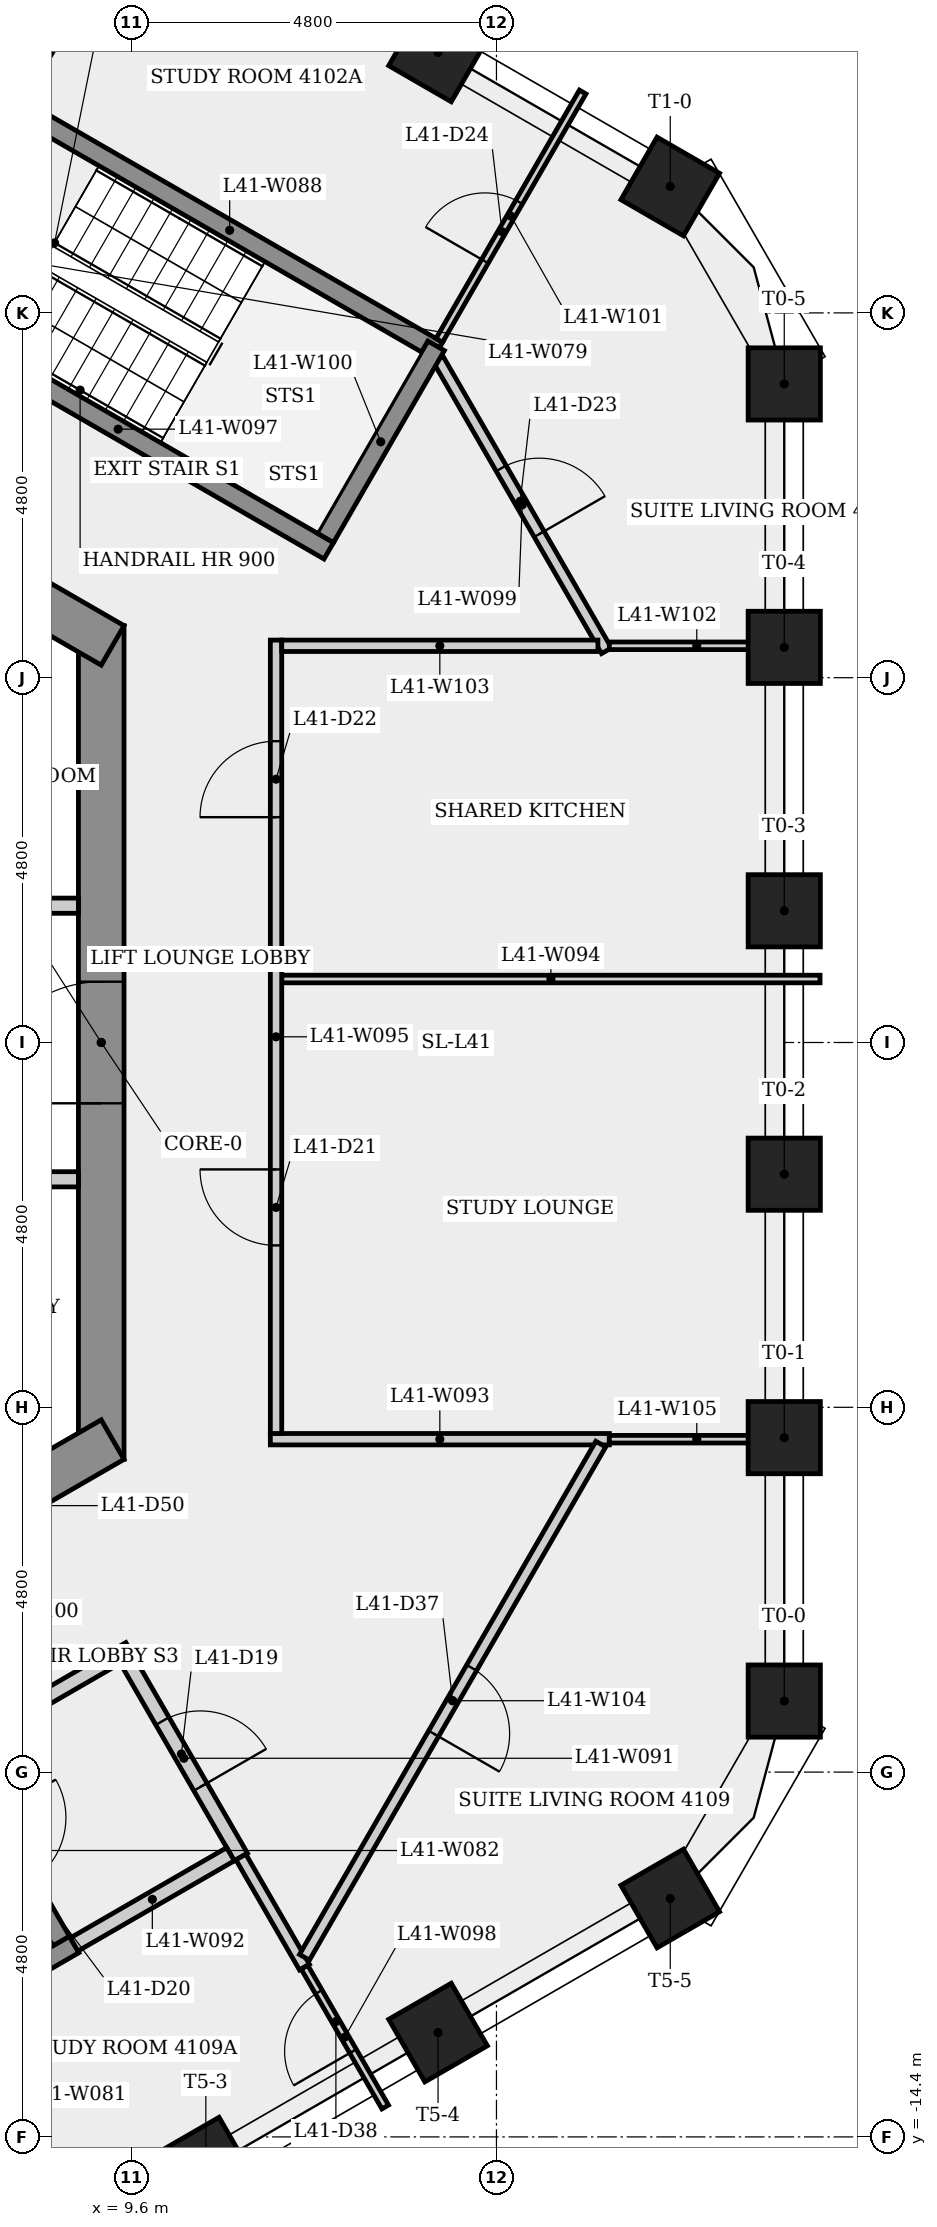
"""IFC4 building model, lengths in metres.
Left out: names, types, materials, properties, quantities, classifications, styles, units other than length and angle.
Written with IfcOpenShell. Run it as: python <this file> out.ifc"""

import sys

from ifc_helpers import new_model, si_unit, direction, frame, frame_2d, origin, origin_2d, place, context, subcontext, project, spatial, rectangle, extrude, element, fill, save


model = new_model("IFC4")
c1 = context("Model", 3, precision=1e-05, world=origin(), true_north=direction((0.0, 1.0)))
c2 = subcontext(c1, "Body", "Model", "MODEL_VIEW")
j1 = project(units=[si_unit("LENGTHUNIT", "METRE"), si_unit("PLANEANGLEUNIT", "RADIAN")], contexts=[c1])
p1 = place(None, origin())
s1 = spatial("IfcSite", under=j1, at=p1, CompositionType="ELEMENT")
p2 = place(p1, origin())
s2 = spatial("IfcBuilding", under=s1, at=p2, CompositionType="ELEMENT")
p3 = place(p2, frame((0.0, 0.0, 156.1)))
s3 = spatial("IfcBuildingStorey", under=s2, at=p3, CompositionType="ELEMENT", Elevation=156.1)
p4 = place(p3, frame((9.2, -5.485, 0.0), z_axis=(0.0, 0.0, 1.0), x_axis=(0.0, 1.0, 0.0)))
e1 = element("IfcWall", 1, at=p4, inside=s3, PredefinedType="SHEAR", context=c2, shape_type="SweptSolid", body=[
    extrude(rectangle(XDim=10.97, YDim=0.6, at=frame_2d((5.485, 0.0))), origin(), (0.0, 0.0, 1.0), 3.4),
])
p5 = place(p4, frame((4.685, 0.0, 0.0)))
e2 = element("IfcOpeningElement", 2, at=p5, cuts=e1, PredefinedType="OPENING", context=c2, shape_type="SweptSolid", body=[
    extrude(rectangle(XDim=1.6, YDim=2.1, at=frame_2d((0.8, 1.05))), frame((0.0, 0.31, 0.0), z_axis=(0.0, -1.0, 0.0), x_axis=(1.0, 0.0, 0.0)), (0.0, 0.0, 1.0), 0.62),
])
p6 = place(p3, frame((9.35, 5.225, 0.0), z_axis=(0.0, 0.0, 1.0), x_axis=(-0.866023993627, 0.500002442456, 0.0)))
e3 = element("IfcWall", 3, at=p6, inside=s3, PredefinedType="SHEAR", context=c2, shape_type="SweptSolid", body=[
    extrude(rectangle(XDim=10.97, YDim=0.6, at=frame_2d((5.485, 0.0))), origin(), (0.0, 0.0, 1.0), 3.4),
])
p7 = place(p6, frame((7.518, 0.0, 0.0)))
e4 = element("IfcOpeningElement", 4, at=p7, cuts=e3, PredefinedType="OPENING", context=c2, shape_type="SweptSolid", body=[
    extrude(rectangle(XDim=0.9, YDim=2.1, at=frame_2d((0.45, 1.05))), frame((0.0, 0.31, 0.0), z_axis=(0.0, -1.0, 0.0), x_axis=(1.0, 0.0, 0.0)), (0.0, 0.0, 1.0), 0.62),
])
p8 = place(p6, frame((1.172, 0.0, 0.0)))
e5 = element("IfcOpeningElement", 5, at=p8, cuts=e3, PredefinedType="OPENING", context=c2, shape_type="SweptSolid", body=[
    extrude(rectangle(XDim=0.9, YDim=2.1, at=frame_2d((0.45, 1.05))), frame((0.0, 0.31, 0.0), z_axis=(0.0, -1.0, 0.0), x_axis=(1.0, 0.0, 0.0)), (0.0, 0.0, 1.0), 0.62),
])
p9 = place(p3, frame((-0.15, -10.71, 0.0), z_axis=(0.0, 0.0, 1.0), x_axis=(0.866023993627, 0.500002442456, 0.0)))
e6 = element("IfcWall", 6, at=p9, inside=s3, PredefinedType="SHEAR", context=c2, shape_type="SweptSolid", body=[
    extrude(rectangle(XDim=10.97, YDim=0.6, at=frame_2d((5.485, 0.0))), origin(), (0.0, 0.0, 1.0), 3.4),
])
p10 = place(p9, frame((1.975, 0.0, 0.0)))
e7 = element("IfcOpeningElement", 7, at=p10, cuts=e6, PredefinedType="OPENING", context=c2, shape_type="SweptSolid", body=[
    extrude(rectangle(XDim=0.9, YDim=2.1, at=frame_2d((0.45, 1.05))), frame((0.0, 0.31, 0.0), z_axis=(0.0, -1.0, 0.0), x_axis=(1.0, 0.0, 0.0)), (0.0, 0.0, 1.0), 0.62),
])
p11 = place(p9, frame((8.782, 0.0, 0.0)))
e8 = element("IfcOpeningElement", 8, at=p11, cuts=e6, PredefinedType="OPENING", context=c2, shape_type="SweptSolid", body=[
    extrude(rectangle(XDim=0.9, YDim=2.1, at=frame_2d((0.45, 1.05))), frame((0.0, 0.31, 0.0), z_axis=(0.0, -1.0, 0.0), x_axis=(1.0, 0.0, 0.0)), (0.0, 0.0, 1.0), 0.62),
])
for number, where, z_axis, x_axis in (
    (9, (18.187, -8.665, 0.0), (0.0, 0.0, 1.0), (1.0, 0.0, 0.0)),
    (10, (18.187, -5.199, 0.0), (0.0, 0.0, 1.0), (1.0, 0.0, 0.0)),
    (11, (18.187, -1.733, 0.0), (0.0, 0.0, 1.0), (1.0, 0.0, 0.0)),
    (12, (18.187, 1.733, 0.0), (0.0, 0.0, 1.0), (1.0, 0.0, 0.0)),
    (13, (18.187, 5.199, 0.0), (0.0, 0.0, 1.0), (1.0, 0.0, 0.0)),
    (14, (18.187, 8.665, 0.0), (0.0, 0.0, 1.0), (1.0, 0.0, 0.0)),
    (15, (16.687, 11.263, 0.0), (0.0, 0.0, 1.0), (0.5, 0.866, 0.0)),
    (16, (13.631, 13.027, 0.0), (0.0, 0.0, 1.0), (0.5, 0.866, 0.0)),
    (17, (10.576, -14.791, 0.0), (0.0, 0.0, 1.0), (0.5, -0.866, 0.0)),
    (18, (13.631, -13.027, 0.0), (0.0, 0.0, 1.0), (0.5, -0.866, 0.0)),
    (19, (16.687, -11.263, 0.0), (0.0, 0.0, 1.0), (0.5, -0.866, 0.0)),
):
    element("IfcColumn", number, at=place(p3, frame(where, z_axis=z_axis, x_axis=x_axis)), inside=s3, PredefinedType="COLUMN", context=c2, shape_type="SweptSolid", body=[
        extrude(rectangle(XDim=0.95, YDim=0.95, at=origin_2d()), origin(), (0.0, 0.0, 1.0), 3.4),
    ])
p12 = place(p3, frame((4.459, 15.323, 0.0), z_axis=(0.0, 0.0, 1.0), x_axis=(0.866016039709, -0.500016218704, 0.0)))
e20 = element("IfcWall", 20, at=p12, inside=s3, PredefinedType="PARTITIONING", context=c2, shape_type="SweptSolid", body=[
    extrude(rectangle(XDim=4.7, YDim=0.2, at=frame_2d((2.35, 0.0))), origin(), (0.0, 0.0, 1.0), 3.05),
])
p13 = place(p3, frame((3.301, -15.068, 0.0), z_axis=(0.0, 0.0, 1.0), x_axis=(0.866035036182, 0.499983315828, 0.0)))
e21 = element("IfcWall", 21, at=p13, inside=s3, PredefinedType="SHEAR", context=c2, shape_type="SweptSolid", body=[
    extrude(rectangle(XDim=6.4, YDim=0.25, at=frame_2d((3.2, 0.0))), origin(), (0.0, 0.0, 1.0), 3.05),
])
p14 = place(p3, frame((7.153, -12.989, 0.0), z_axis=(0.0, 0.0, 1.0), x_axis=(0.500008086624, -0.86602073492, 0.0)))
e22 = element("IfcWall", 22, at=p14, inside=s3, PredefinedType="PARTITIONING", context=c2, shape_type="SweptSolid", body=[
    extrude(rectangle(XDim=3.773, YDim=0.1, at=frame_2d((1.887, 0.0))), origin(), (0.0, 0.0, 1.0), 3.05),
])
p15 = place(p3, frame((7.298, -9.441, 0.0), z_axis=(0.0, 0.0, 1.0), x_axis=(0.500034990121, -0.866005201286, 0.0)))
e23 = element("IfcWall", 23, at=p15, inside=s3, PredefinedType="SHEAR", context=c2, shape_type="SweptSolid", body=[
    extrude(rectangle(XDim=2.75, YDim=0.25, at=frame_2d((1.375, 0.0))), origin(), (0.0, 0.0, 1.0), 3.05),
])
p16 = place(p15, frame((0.875, 0.0, 0.0)))
e24 = element("IfcOpeningElement", 24, at=p16, cuts=e23, PredefinedType="OPENING", context=c2, shape_type="SweptSolid", body=[
    extrude(rectangle(XDim=1.0, YDim=2.1, at=frame_2d((0.5, 1.05))), frame((0.0, 0.135, 0.0), z_axis=(0.0, -1.0, 0.0), x_axis=(1.0, 0.0, 0.0)), (0.0, 0.0, 1.0), 0.27),
])
p17 = place(p3, frame((7.344, -9.27, 0.0), z_axis=(0.0, 0.0, 1.0), x_axis=(0.866005588531, 0.500034319456, 0.0)))
e25 = element("IfcWall", 25, at=p17, inside=s3, PredefinedType="PARTITIONING", context=c2, shape_type="SweptSolid", body=[
    extrude(rectangle(XDim=2.575, YDim=0.2, at=frame_2d((1.288, 0.0))), origin(), (0.0, 0.0, 1.0), 3.05),
])
p18 = place(p3, frame((7.475, 1.8, 0.0), z_axis=(0.0, 0.0, 1.0), x_axis=(1.0, 0.0, 0.0)))
e26 = element("IfcWall", 26, at=p18, inside=s3, PredefinedType="PARTITIONING", context=c2, shape_type="SweptSolid", body=[
    extrude(rectangle(XDim=1.425, YDim=0.2, at=frame_2d((0.712, 0.0))), origin(), (0.0, 0.0, 1.0), 3.05),
])
p19 = place(p3, frame((8.151, 12.268, 0.0), z_axis=(0.0, 0.0, 1.0), x_axis=(0.866032601554, -0.49998753289, 0.0)))
e27 = element("IfcWall", 27, at=p19, inside=s3, PredefinedType="SHEAR", context=c2, shape_type="SweptSolid", body=[
    extrude(rectangle(XDim=6.325, YDim=0.25, at=frame_2d((3.163, 0.0))), origin(), (0.0, 0.0, 1.0), 3.05),
])
p20 = place(p3, frame((8.9, -1.8, 0.0), z_axis=(0.0, 0.0, 1.0), x_axis=(-1.0, 0.0, 0.0)))
e28 = element("IfcWall", 28, at=p20, inside=s3, PredefinedType="PARTITIONING", context=c2, shape_type="SweptSolid", body=[
    extrude(rectangle(XDim=1.425, YDim=0.2, at=frame_2d((0.712, 0.0))), origin(), (0.0, 0.0, 1.0), 3.05),
])
p21 = place(p3, frame((9.537, -8.119, 0.0), z_axis=(0.0, 0.0, 1.0), x_axis=(0.499990139034, -0.866031096941, 0.0)))
e29 = element("IfcWall", 29, at=p21, inside=s3, PredefinedType="PARTITIONING", context=c2, shape_type="SweptSolid", body=[
    extrude(rectangle(XDim=3.0, YDim=0.2, at=frame_2d((1.5, 0.0))), origin(), (0.0, 0.0, 1.0), 3.05),
])
p22 = place(p21, frame((0.935, 0.0, 0.0)))
e30 = element("IfcOpeningElement", 30, at=p22, cuts=e29, PredefinedType="OPENING", context=c2, shape_type="SweptSolid", body=[
    extrude(rectangle(XDim=1.0, YDim=2.1, at=frame_2d((0.5, 1.05))), frame((0.0, 0.11, 0.0), z_axis=(0.0, -1.0, 0.0), x_axis=(1.0, 0.0, 0.0)), (0.0, 0.0, 1.0), 0.22),
])
p23 = place(p3, frame((10.901, -10.681, 0.0), z_axis=(0.0, 0.0, 1.0), x_axis=(-0.866007538022, -0.500030943131, 0.0)))
e31 = element("IfcWall", 31, at=p23, inside=s3, PredefinedType="PARTITIONING", context=c2, shape_type="SweptSolid", body=[
    extrude(rectangle(XDim=2.375, YDim=0.2, at=frame_2d((1.188, 0.0))), origin(), (0.0, 0.0, 1.0), 3.05),
])
p24 = place(p3, frame((11.425, -5.22, 0.0), z_axis=(0.0, 0.0, 1.0), x_axis=(1.0, 0.0, 0.0)))
e32 = element("IfcWall", 32, at=p24, inside=s3, PredefinedType="PARTITIONING", context=c2, shape_type="SweptSolid", body=[
    extrude(rectangle(XDim=4.46, YDim=0.15, at=frame_2d((2.23, 0.0))), origin(), (0.0, 0.0, 1.0), 3.05),
])
p25 = place(p3, frame((11.575, 0.835, 0.0), z_axis=(0.0, 0.0, 1.0), x_axis=(1.0, 0.0, 0.0)))
e33 = element("IfcWall", 33, at=p25, inside=s3, PredefinedType="PARTITIONING", context=c2, shape_type="SweptSolid", body=[
    extrude(rectangle(XDim=7.083, YDim=0.1, at=frame_2d((3.541, 0.0))), origin(), (0.0, 0.0, 1.0), 3.05),
])
p26 = place(p3, frame((11.5, -5.145, 0.0), z_axis=(0.0, 0.0, 1.0), x_axis=(0.0, 1.0, 0.0)))
e34 = element("IfcWall", 34, at=p26, inside=s3, PredefinedType="PARTITIONING", context=c2, shape_type="SweptSolid", body=[
    extrude(rectangle(XDim=10.439, YDim=0.15, at=frame_2d((5.22, 0.0))), origin(), (0.0, 0.0, 1.0), 3.05),
])
p27 = place(p26, frame((2.475, 0.0, 0.0)))
e35 = element("IfcOpeningElement", 35, at=p27, cuts=e34, PredefinedType="OPENING", context=c2, shape_type="SweptSolid", body=[
    extrude(rectangle(XDim=1.0, YDim=2.1, at=frame_2d((0.5, 1.05))), frame((0.0, 0.085, 0.0), z_axis=(0.0, -1.0, 0.0), x_axis=(1.0, 0.0, 0.0)), (0.0, 0.0, 1.0), 0.17),
])
p28 = place(p26, frame((8.109, 0.0, 0.0)))
e36 = element("IfcOpeningElement", 36, at=p28, cuts=e34, PredefinedType="OPENING", context=c2, shape_type="SweptSolid", body=[
    extrude(rectangle(XDim=1.0, YDim=2.1, at=frame_2d((0.5, 1.05))), frame((0.0, 0.085, 0.0), z_axis=(0.0, -1.0, 0.0), x_axis=(1.0, 0.0, 0.0)), (0.0, 0.0, 1.0), 0.17),
])
p29 = place(p3, frame((11.874, -12.167, 0.0), z_axis=(0.0, 0.0, 1.0), x_axis=(-0.499920289095, 0.866071420006, 0.0)))
e37 = element("IfcWall", 37, at=p29, inside=s3, PredefinedType="PARTITIONING", context=c2, shape_type="SweptSolid", body=[
    extrude(rectangle(XDim=1.674, YDim=0.15, at=frame_2d((0.837, 0.0))), origin(), (0.0, 0.0, 1.0), 3.05),
])
p30 = place(p3, frame((12.194, 6.47, 0.0), z_axis=(0.0, 0.0, 1.0), x_axis=(-0.866025499775, 0.499999833739, 0.0)))
e38 = element("IfcWall", 38, at=p30, inside=s3, PredefinedType="SHEAR", context=c2, shape_type="SweptSolid", body=[
    extrude(rectangle(XDim=6.4, YDim=0.25, at=frame_2d((3.2, 0.0))), origin(), (0.0, 0.0, 1.0), 3.05),
])
p31 = place(p30, frame((5.25, 0.0, 0.0)))
e39 = element("IfcOpeningElement", 39, at=p31, cuts=e38, PredefinedType="OPENING", context=c2, shape_type="SweptSolid", body=[
    extrude(rectangle(XDim=1.0, YDim=2.1, at=frame_2d((0.5, 1.05))), frame((0.0, 0.135, 0.0), z_axis=(0.0, -1.0, 0.0), x_axis=(1.0, 0.0, 0.0)), (0.0, 0.0, 1.0), 0.27),
])
p32 = place(p3, frame((12.936, -14.007, 0.0), z_axis=(0.0, 0.0, 1.0), x_axis=(-0.499957859296, 0.866049732364, 0.0)))
e40 = element("IfcWall", 40, at=p32, inside=s3, PredefinedType="PARTITIONING", context=c2, shape_type="SweptSolid", body=[
    extrude(rectangle(XDim=2.125, YDim=0.1, at=frame_2d((1.062, 0.0))), origin(), (0.0, 0.0, 1.0), 3.05),
])
p33 = place(p32, frame((0.848, 0.0, 0.0)))
e41 = element("IfcOpeningElement", 41, at=p33, cuts=e40, PredefinedType="OPENING", context=c2, shape_type="SweptSolid", body=[
    extrude(rectangle(XDim=0.9, YDim=2.1, at=frame_2d((0.45, 1.05))), frame((0.0, 0.06, 0.0), z_axis=(0.0, -1.0, 0.0), x_axis=(1.0, 0.0, 0.0)), (0.0, 0.0, 1.0), 0.12),
])
p34 = place(p3, frame((13.631, 8.993, 0.0), z_axis=(0.0, 0.0, 1.0), x_axis=(0.500013290014, -0.866017730655, 0.0)))
e42 = element("IfcWall", 42, at=p34, inside=s3, PredefinedType="PARTITIONING", context=c2, shape_type="SweptSolid", body=[
    extrude(rectangle(XDim=4.433, YDim=0.15, at=frame_2d((2.216, 0.0))), origin(), (0.0, 0.0, 1.0), 3.05),
])
p35 = place(p34, frame((1.661, 0.0, 0.0)))
e43 = element("IfcOpeningElement", 43, at=p35, cuts=e42, PredefinedType="OPENING", context=c2, shape_type="SweptSolid", body=[
    extrude(rectangle(XDim=1.0, YDim=2.1, at=frame_2d((0.5, 1.05))), frame((0.0, 0.085, 0.0), z_axis=(0.0, -1.0, 0.0), x_axis=(1.0, 0.0, 0.0)), (0.0, 0.0, 1.0), 0.17),
])
p36 = place(p3, frame((13.606, 9.167, 0.0), z_axis=(0.0, 0.0, 1.0), x_axis=(-0.499983307531, -0.866035040971, 0.0)))
e44 = element("IfcWall", 44, at=p36, inside=s3, PredefinedType="SHEAR", context=c2, shape_type="SweptSolid", body=[
    extrude(rectangle(XDim=2.917, YDim=0.25, at=frame_2d((1.458, 0.0))), origin(), (0.0, 0.0, 1.0), 3.05),
])
p37 = place(p3, frame((13.648, 9.239, 0.0), z_axis=(0.0, 0.0, 1.0), x_axis=(0.500008086624, 0.86602073492, 0.0)))
e45 = element("IfcWall", 45, at=p37, inside=s3, PredefinedType="PARTITIONING", context=c2, shape_type="SweptSolid", body=[
    extrude(rectangle(XDim=3.773, YDim=0.1, at=frame_2d((1.887, 0.0))), origin(), (0.0, 0.0, 1.0), 3.05),
])
p38 = place(p37, frame((1.201, 0.0, 0.0)))
e46 = element("IfcOpeningElement", 46, at=p38, cuts=e45, PredefinedType="OPENING", context=c2, shape_type="SweptSolid", body=[
    extrude(rectangle(XDim=0.9, YDim=2.1, at=frame_2d((0.45, 1.05))), frame((0.0, 0.06, 0.0), z_axis=(0.0, -1.0, 0.0), x_axis=(1.0, 0.0, 0.0)), (0.0, 0.0, 1.0), 0.12),
])
p39 = place(p3, frame((15.885, 5.22, 0.0), z_axis=(0.0, 0.0, 1.0), x_axis=(1.0, 0.0, 0.0)))
e47 = element("IfcWall", 47, at=p39, inside=s3, PredefinedType="PARTITIONING", context=c2, shape_type="SweptSolid", body=[
    extrude(rectangle(XDim=2.302, YDim=0.1, at=frame_2d((1.151, 0.0))), origin(), (0.0, 0.0, 1.0), 3.05),
])
p40 = place(p3, frame((15.735, 5.22, 0.0), z_axis=(0.0, 0.0, 1.0), x_axis=(-1.0, 0.0, 0.0)))
e48 = element("IfcWall", 48, at=p40, inside=s3, PredefinedType="PARTITIONING", context=c2, shape_type="SweptSolid", body=[
    extrude(rectangle(XDim=4.16, YDim=0.15, at=frame_2d((2.08, 0.0))), origin(), (0.0, 0.0, 1.0), 3.05),
])
p41 = place(p3, frame((15.772, -5.285, 0.0), z_axis=(0.0, 0.0, 1.0), x_axis=(-0.500018810599, -0.866014543207, 0.0)))
e49 = element("IfcWall", 49, at=p41, inside=s3, PredefinedType="PARTITIONING", context=c2, shape_type="SweptSolid", body=[
    extrude(rectangle(XDim=7.797, YDim=0.15, at=frame_2d((3.898, 0.0))), origin(), (0.0, 0.0, 1.0), 3.05),
])
p42 = place(p41, frame((3.398, 0.0, 0.0)))
e50 = element("IfcOpeningElement", 50, at=p42, cuts=e49, PredefinedType="OPENING", context=c2, shape_type="SweptSolid", body=[
    extrude(rectangle(XDim=1.0, YDim=2.1, at=frame_2d((0.5, 1.05))), frame((0.0, 0.085, 0.0), z_axis=(0.0, -1.0, 0.0), x_axis=(1.0, 0.0, 0.0)), (0.0, 0.0, 1.0), 0.17),
])
p43 = place(p3, frame((18.187, -5.22, 0.0), z_axis=(0.0, 0.0, 1.0), x_axis=(-1.0, 0.0, 0.0)))
e51 = element("IfcWall", 51, at=p43, inside=s3, PredefinedType="PARTITIONING", context=c2, shape_type="SweptSolid", body=[
    extrude(rectangle(XDim=2.302, YDim=0.1, at=frame_2d((1.151, 0.0))), origin(), (0.0, 0.0, 1.0), 3.05),
])
p44 = place(p22, origin())
e52 = element("IfcDoor", 52, at=p44, inside=s3, OperationType="SINGLE_SWING_RIGHT", PredefinedType="DOOR", context=c2, shape_type="SweptSolid", body=[
    extrude(rectangle(XDim=1.0, YDim=2.1, at=frame_2d((0.5, 1.05))), frame((0.0, 0.025, 0.0), z_axis=(0.0, -1.0, 0.0), x_axis=(1.0, 0.0, 0.0)), (0.0, 0.0, 1.0), 0.05),
])
fill(e30, e52)
p45 = place(p27, origin())
e53 = element("IfcDoor", 53, at=p45, inside=s3, OperationType="SINGLE_SWING_RIGHT", PredefinedType="DOOR", context=c2, shape_type="SweptSolid", body=[
    extrude(rectangle(XDim=1.0, YDim=2.1, at=frame_2d((0.5, 1.05))), frame((0.0, 0.025, 0.0), z_axis=(0.0, -1.0, 0.0), x_axis=(1.0, 0.0, 0.0)), (0.0, 0.0, 1.0), 0.05),
])
fill(e35, e53)
p46 = place(p28, origin())
e54 = element("IfcDoor", 54, at=p46, inside=s3, OperationType="SINGLE_SWING_LEFT", PredefinedType="DOOR", context=c2, shape_type="SweptSolid", body=[
    extrude(rectangle(XDim=1.0, YDim=2.1, at=frame_2d((0.5, 1.05))), frame((0.0, 0.025, 0.0), z_axis=(0.0, -1.0, 0.0), x_axis=(1.0, 0.0, 0.0)), (0.0, 0.0, 1.0), 0.05),
])
fill(e36, e54)
p47 = place(p35, origin())
e55 = element("IfcDoor", 55, at=p47, inside=s3, OperationType="SINGLE_SWING_RIGHT", PredefinedType="DOOR", context=c2, shape_type="SweptSolid", body=[
    extrude(rectangle(XDim=1.0, YDim=2.1, at=frame_2d((0.5, 1.05))), frame((0.0, 0.025, 0.0), z_axis=(0.0, -1.0, 0.0), x_axis=(1.0, 0.0, 0.0)), (0.0, 0.0, 1.0), 0.05),
])
fill(e43, e55)
p48 = place(p38, origin())
e56 = element("IfcDoor", 56, at=p48, inside=s3, OperationType="SINGLE_SWING_LEFT", PredefinedType="DOOR", context=c2, shape_type="SweptSolid", body=[
    extrude(rectangle(XDim=0.9, YDim=2.1, at=frame_2d((0.45, 1.05))), frame((0.0, 0.025, 0.0), z_axis=(0.0, -1.0, 0.0), x_axis=(1.0, 0.0, 0.0)), (0.0, 0.0, 1.0), 0.05),
])
fill(e46, e56)
p49 = place(p42, origin())
e57 = element("IfcDoor", 57, at=p49, inside=s3, OperationType="SINGLE_SWING_RIGHT", PredefinedType="DOOR", context=c2, shape_type="SweptSolid", body=[
    extrude(rectangle(XDim=1.0, YDim=2.1, at=frame_2d((0.5, 1.05))), frame((0.0, 0.025, 0.0), z_axis=(0.0, -1.0, 0.0), x_axis=(1.0, 0.0, 0.0)), (0.0, 0.0, 1.0), 0.05),
])
fill(e50, e57)
p50 = place(p33, origin())
e58 = element("IfcDoor", 58, at=p50, inside=s3, OperationType="SINGLE_SWING_LEFT", PredefinedType="DOOR", context=c2, shape_type="SweptSolid", body=[
    extrude(rectangle(XDim=0.9, YDim=2.1, at=frame_2d((0.45, 1.05))), frame((0.0, 0.025, 0.0), z_axis=(0.0, -1.0, 0.0), x_axis=(1.0, 0.0, 0.0)), (0.0, 0.0, 1.0), 0.05),
])
fill(e41, e58)
p51 = place(p5, origin())
e59 = element("IfcDoor", 59, at=p51, inside=s3, OperationType="SINGLE_SWING_LEFT", PredefinedType="DOOR", context=c2, shape_type="SweptSolid", body=[
    extrude(rectangle(XDim=1.6, YDim=2.1, at=frame_2d((0.8, 1.05))), frame((0.0, 0.025, 0.0), z_axis=(0.0, -1.0, 0.0), x_axis=(1.0, 0.0, 0.0)), (0.0, 0.0, 1.0), 0.05),
])
fill(e2, e59)
save(model, sys.argv[1])
